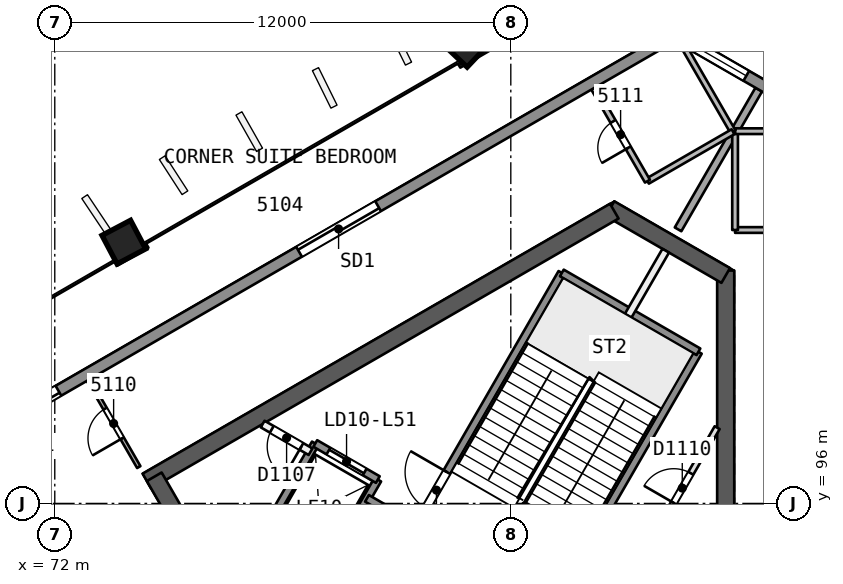
"""IFC4 building model, lengths in metres.
Left out: names, types, materials, properties, quantities, classifications, styles, units other than length and angle.
Written with IfcOpenShell. Run it as: python <this file> out.ifc"""

import sys

from ifc_helpers import new_model, si_unit, direction, frame, frame_2d, origin, origin_2d, place, context, subcontext, project, spatial, rectangle, extrude, element, fill, save


model = new_model("IFC4")
c1 = context("Model", 3, precision=1e-05, world=origin(), true_north=direction((0.0, 1.0)))
c2 = subcontext(c1, "Body", "Model", "MODEL_VIEW")
j1 = project(units=[si_unit("LENGTHUNIT", "METRE"), si_unit("PLANEANGLEUNIT", "RADIAN")], contexts=[c1])
p1 = place(None, origin())
s1 = spatial("IfcSite", under=j1, at=p1, CompositionType="ELEMENT")
p2 = place(p1, origin())
s2 = spatial("IfcBuilding", under=s1, at=p2, CompositionType="ELEMENT")
p3 = place(p2, frame((0.0, 0.0, 209.5)))
s3 = spatial("IfcBuildingStorey", under=s2, at=p3, CompositionType="ELEMENT", Elevation=209.5)
p4 = place(p3, frame((89.655, 88.019, 0.0), z_axis=(0.0, 0.0, 1.0), x_axis=(0.0, 1.0, 0.0)))
e1 = element("IfcWall", 1, at=p4, inside=s3, PredefinedType="SHEAR", context=c2, shape_type="SweptSolid", body=[
    extrude(rectangle(XDim=14.108, YDim=0.45, at=frame_2d((7.054, 0.0))), origin(), (0.0, 0.0, 1.0), 3.7),
])
p5 = place(p3, frame((89.655, 101.998, 0.0), z_axis=(0.0, 0.0, 1.0), x_axis=(-0.866042179588, 0.49997094233, 0.0)))
e2 = element("IfcWall", 2, at=p5, inside=s3, PredefinedType="SHEAR", context=c2, shape_type="SweptSolid", body=[
    extrude(rectangle(XDim=3.515, YDim=0.45, at=frame_2d((1.758, 0.0))), origin(), (0.0, 0.0, 1.0), 3.7),
])
p6 = place(p3, frame((86.723, 103.69, 0.0), z_axis=(0.0, 0.0, 1.0), x_axis=(-0.866022713978, -0.500004658852, 0.0)))
e3 = element("IfcWall", 3, at=p6, inside=s3, PredefinedType="SHEAR", context=c2, shape_type="SweptSolid", body=[
    extrude(rectangle(XDim=14.203, YDim=0.45, at=frame_2d((7.102, 0.0))), origin(), (0.0, 0.0, 1.0), 3.7),
])
p7 = place(p3, frame((74.617, 96.701, 0.0), z_axis=(0.0, 0.0, 1.0), x_axis=(0.499994385119, -0.866028645513, 0.0)))
e4 = element("IfcWall", 4, at=p7, inside=s3, PredefinedType="SHEAR", context=c2, shape_type="SweptSolid", body=[
    extrude(rectangle(XDim=10.155, YDim=0.45, at=frame_2d((5.077, 0.0))), origin(), (0.0, 0.0, 1.0), 3.7),
])
p8 = place(p7, frame((8.005, 0.0, 0.0)))
e5 = element("IfcOpeningElement", 5, at=p8, cuts=e4, PredefinedType="OPENING", context=c2, shape_type="SweptSolid", body=[
    extrude(rectangle(XDim=1.2, YDim=2.1, at=frame_2d((0.6, 1.05))), frame((0.0, 0.235, 0.0), z_axis=(0.0, -1.0, 0.0), x_axis=(1.0, 0.0, 0.0)), (0.0, 0.0, 1.0), 0.471),
])
p9 = place(p3, frame((91.874, 109.226, 0.0), z_axis=(-0.017607037296, -0.030466109479, 0.999380712447), x_axis=(0.86581098392, -0.500371202332, 2.457e-09)))
e6 = element("IfcColumn", 6, at=p9, inside=s3, PredefinedType="COLUMN", context=c2, shape_type="SweptSolid", body=[
    extrude(rectangle(XDim=1.9, YDim=1.9, at=origin_2d()), origin(), (0.0, 0.0, 1.0), 3.702),
])
p10 = place(p3, frame((82.845, 108.115, 0.0), z_axis=(-0.008376454378, -0.028163354484, 0.999568237028), x_axis=(0.86585218107, 0.499844611273, 0.021339285781)))
e7 = element("IfcColumn", 7, at=p10, inside=s3, PredefinedType="COLUMN", context=c2, shape_type="SweptSolid", body=[
    extrude(rectangle(XDim=0.85, YDim=0.85, at=origin_2d()), origin(), (0.0, 0.0, 1.0), 3.702),
])
p11 = place(p3, frame((73.816, 102.902, 0.0), z_axis=(0.000857578916, -0.022824792675, 0.999739112668), x_axis=(0.866060437909, 0.499825470945, 0.010668480848)))
e8 = element("IfcColumn", 8, at=p11, inside=s3, PredefinedType="COLUMN", context=c2, shape_type="SweptSolid", body=[
    extrude(rectangle(XDim=0.85, YDim=0.85, at=origin_2d()), origin(), (0.0, 0.0, 1.0), 3.701),
])
p12 = place(p3, frame((92.727, 103.194, 0.0), z_axis=(0.0, 0.0, 1.0), x_axis=(-1.0, 0.0, 0.0)))
e9 = element("IfcWall", 9, at=p12, inside=s3, PredefinedType="PARTITIONING", context=c2, shape_type="SweptSolid", body=[
    extrude(rectangle(XDim=2.825, YDim=0.15, at=frame_2d((1.413, 0.0))), origin(), (0.0, 0.0, 1.0), 3.3),
])
p13 = place(p12, frame((1.013, 0.0, 0.0)))
e10 = element("IfcOpeningElement", 10, at=p13, cuts=e9, PredefinedType="OPENING", context=c2, shape_type="SweptSolid", body=[
    extrude(rectangle(XDim=0.8, YDim=2.1, at=frame_2d((0.4, 1.05))), frame((0.0, 0.085, 0.0), z_axis=(0.0, -1.0, 0.0), x_axis=(1.0, 0.0, 0.0)), (0.0, 0.0, 1.0), 0.171),
])
p14 = place(p3, frame((89.902, 103.194, 0.0), z_axis=(0.0, 0.0, 1.0), x_axis=(0.0, 1.0, 0.0)))
e11 = element("IfcWall", 11, at=p14, inside=s3, PredefinedType="PARTITIONING", context=c2, shape_type="SweptSolid", body=[
    extrude(rectangle(XDim=2.6, YDim=0.15, at=frame_2d((1.3, 0.0))), origin(), (0.0, 0.0, 1.0), 3.3),
])
p15 = place(p3, frame((89.902, 105.794, 0.0), z_axis=(0.0, 0.0, 1.0), x_axis=(1.0, 0.0, 0.0)))
e12 = element("IfcWall", 12, at=p15, inside=s3, PredefinedType="PARTITIONING", context=c2, shape_type="SweptSolid", body=[
    extrude(rectangle(XDim=2.519, YDim=0.15, at=frame_2d((1.259, 0.0))), origin(), (0.0, 0.0, 1.0), 3.3),
])
p16 = place(p3, frame((90.524, 106.889, 0.0), z_axis=(0.0, 0.0, 1.0), x_axis=(-0.499991184371, -0.86603049343, 0.0)))
e13 = element("IfcWall", 13, at=p16, inside=s3, PredefinedType="PARTITIONING", context=c2, shape_type="SweptSolid", body=[
    extrude(rectangle(XDim=4.247, YDim=0.2, at=frame_2d((2.123, 0.0))), origin(), (0.0, 0.0, 1.0), 3.3),
])
p17 = place(p3, frame((74.21, 96.956, 0.0), z_axis=(0.0, 0.0, 1.0), x_axis=(-0.49995654735, 0.86605048973, 0.0)))
e14 = element("IfcWall", 14, at=p17, inside=s3, PredefinedType="PARTITIONING", context=c2, shape_type="SweptSolid", body=[
    extrude(rectangle(XDim=2.648, YDim=0.1, at=frame_2d((1.324, 0.0))), origin(), (0.0, 0.0, 1.0), 3.3),
])
p18 = place(p17, frame((0.874, 0.0, 0.0)))
e15 = element("IfcOpeningElement", 15, at=p18, cuts=e14, PredefinedType="OPENING", context=c2, shape_type="SweptSolid", body=[
    extrude(rectangle(XDim=0.9, YDim=2.1, at=frame_2d((0.45, 1.05))), frame((0.0, 0.061, 0.0), z_axis=(0.0, -1.0, 0.0), x_axis=(1.0, 0.0, 0.0)), (0.0, 0.0, 1.0), 0.121),
])
p19 = place(p3, frame((69.376, 97.223, 0.0), z_axis=(0.0, 0.0, 1.0), x_axis=(0.499993571489, -0.866029115255, 0.0)))
e16 = element("IfcWall", 16, at=p19, inside=s3, PredefinedType="PARTITIONING", context=c2, shape_type="SweptSolid", body=[
    extrude(rectangle(XDim=10.627, YDim=0.2, at=frame_2d((5.313, 0.0))), origin(), (0.0, 0.0, 1.0), 3.3),
])
p20 = place(p3, frame((88.548, 108.03, 0.0), z_axis=(0.0, 0.0, 1.0), x_axis=(0.500058503878, -0.86599162392, 0.0)))
e17 = element("IfcWall", 17, at=p20, inside=s3, PredefinedType="PARTITIONING", context=c2, shape_type="SweptSolid", body=[
    extrude(rectangle(XDim=2.599, YDim=0.15, at=frame_2d((1.3, 0.0))), origin(), (0.0, 0.0, 1.0), 3.3),
])
p21 = place(p3, frame((89.848, 105.779, 0.0), z_axis=(0.0, 0.0, 1.0), x_axis=(-0.866021400173, -0.500006934395, 0.0)))
e18 = element("IfcWall", 18, at=p21, inside=s3, PredefinedType="PARTITIONING", context=c2, shape_type="SweptSolid", body=[
    extrude(rectangle(XDim=2.6, YDim=0.15, at=frame_2d((1.3, 0.0))), origin(), (0.0, 0.0, 1.0), 3.3),
])
p22 = place(p3, frame((87.596, 104.479, 0.0), z_axis=(0.0, 0.0, 1.0), x_axis=(-0.500014143148, 0.86601723808, 0.0)))
e19 = element("IfcWall", 19, at=p22, inside=s3, PredefinedType="PARTITIONING", context=c2, shape_type="SweptSolid", body=[
    extrude(rectangle(XDim=2.826, YDim=0.15, at=frame_2d((1.413, 0.0))), origin(), (0.0, 0.0, 1.0), 3.3),
])
p23 = place(p22, frame((1.013, 0.0, 0.0)))
e20 = element("IfcOpeningElement", 20, at=p23, cuts=e19, PredefinedType="OPENING", context=c2, shape_type="SweptSolid", body=[
    extrude(rectangle(XDim=0.8, YDim=2.1, at=frame_2d((0.4, 1.05))), frame((0.0, 0.085, 0.0), z_axis=(0.0, -1.0, 0.0), x_axis=(1.0, 0.0, 0.0)), (0.0, 0.0, 1.0), 0.171),
])
p24 = place(p3, frame((88.322, 108.333, 0.0), z_axis=(0.0, 0.0, 1.0), x_axis=(0.866014735099, -0.50001847825, 0.0)))
e21 = element("IfcWall", 21, at=p24, inside=s3, PredefinedType="SOLIDWALL", context=c2, shape_type="SweptSolid", body=[
    extrude(rectangle(XDim=5.259, YDim=0.3, at=frame_2d((2.629, 0.0))), origin(), (0.0, 0.0, 1.0), 3.3),
])
p25 = place(p24, frame((3.082, 0.0, 0.9)))
e22 = element("IfcOpeningElement", 22, at=p25, cuts=e21, PredefinedType="OPENING", context=c2, shape_type="SweptSolid", body=[
    extrude(rectangle(XDim=1.8, YDim=1.5, at=frame_2d((0.9, 0.75))), frame((0.0, 0.161, 0.0), z_axis=(0.0, -1.0, 0.0), x_axis=(1.0, 0.0, 0.0)), (0.0, 0.0, 1.0), 0.321),
])
p26 = place(p24, frame((0.365, 0.0, 0.9)))
e23 = element("IfcOpeningElement", 23, at=p26, cuts=e21, PredefinedType="OPENING", context=c2, shape_type="SweptSolid", body=[
    extrude(rectangle(XDim=1.8, YDim=1.5, at=frame_2d((0.9, 0.75))), frame((0.0, 0.161, 0.0), z_axis=(0.0, -1.0, 0.0), x_axis=(1.0, 0.0, 0.0)), (0.0, 0.0, 1.0), 0.321),
])
p27 = place(p3, frame((43.802, 82.63, 0.0), z_axis=(0.0, 0.0, 1.0), x_axis=(0.866026224187, 0.499998579018, 0.0)))
e24 = element("IfcWall", 24, at=p27, inside=s3, PredefinedType="SOLIDWALL", context=c2, shape_type="SweptSolid", body=[
    extrude(rectangle(XDim=51.406, YDim=0.3, at=frame_2d((25.703, 0.0))), origin(), (0.0, 0.0, 1.0), 3.3),
])
p28 = place(p27, frame((24.503, 0.0, 0.0)))
e25 = element("IfcOpeningElement", 25, at=p28, cuts=e24, PredefinedType="OPENING", context=c2, shape_type="SweptSolid", body=[
    extrude(rectangle(XDim=2.4, YDim=2.4, at=frame_2d((1.2, 1.2))), frame((0.0, 0.161, 0.0), z_axis=(0.0, -1.0, 0.0), x_axis=(1.0, 0.0, 0.0)), (0.0, 0.0, 1.0), 0.321),
])
p29 = place(p27, frame((30.271, 0.0, 0.0)))
e26 = element("IfcOpeningElement", 26, at=p29, cuts=e24, PredefinedType="OPENING", context=c2, shape_type="SweptSolid", body=[
    extrude(rectangle(XDim=2.4, YDim=2.4, at=frame_2d((1.2, 1.2))), frame((0.0, 0.161, 0.0), z_axis=(0.0, -1.0, 0.0), x_axis=(1.0, 0.0, 0.0)), (0.0, 0.0, 1.0), 0.321),
])
p30 = place(p27, frame((39.983, 0.0, 0.0)))
e27 = element("IfcOpeningElement", 27, at=p30, cuts=e24, PredefinedType="OPENING", context=c2, shape_type="SweptSolid", body=[
    extrude(rectangle(XDim=2.4, YDim=2.4, at=frame_2d((1.2, 1.2))), frame((0.0, 0.161, 0.0), z_axis=(0.0, -1.0, 0.0), x_axis=(1.0, 0.0, 0.0)), (0.0, 0.0, 1.0), 0.321),
])
p31 = place(p27, frame((18.736, 0.0, 0.0)))
e28 = element("IfcOpeningElement", 28, at=p31, cuts=e24, PredefinedType="OPENING", context=c2, shape_type="SweptSolid", body=[
    extrude(rectangle(XDim=2.4, YDim=2.4, at=frame_2d((1.2, 1.2))), frame((0.0, 0.161, 0.0), z_axis=(0.0, -1.0, 0.0), x_axis=(1.0, 0.0, 0.0)), (0.0, 0.0, 1.0), 0.321),
])
p32 = place(p27, frame((9.0, 0.0, 0.0)))
e29 = element("IfcOpeningElement", 29, at=p32, cuts=e24, PredefinedType="OPENING", context=c2, shape_type="SweptSolid", body=[
    extrude(rectangle(XDim=2.4, YDim=2.4, at=frame_2d((1.2, 1.2))), frame((0.0, 0.161, 0.0), z_axis=(0.0, -1.0, 0.0), x_axis=(1.0, 0.0, 0.0)), (0.0, 0.0, 1.0), 0.321),
])
p33 = place(p3, frame((87.621, 94.86, 0.0), z_axis=(0.0, 0.0, 1.0), x_axis=(0.499993116331, 0.866029378036, 0.0)))
e30 = element("IfcWall", 30, at=p33, inside=s3, PredefinedType="PARTITIONING", context=c2, shape_type="SweptSolid", body=[
    extrude(rectangle(XDim=3.618, YDim=0.15, at=frame_2d((1.809, 0.0))), origin(), (0.0, 0.0, 1.0), 3.3),
])
p34 = place(p33, frame((1.332, 0.0, 0.0)))
e31 = element("IfcOpeningElement", 31, at=p34, cuts=e30, PredefinedType="OPENING", context=c2, shape_type="SweptSolid", body=[
    extrude(rectangle(XDim=0.9, YDim=2.1, at=frame_2d((0.45, 1.05))), frame((0.0, 0.085, 0.0), z_axis=(0.0, -1.0, 0.0), x_axis=(1.0, 0.0, 0.0)), (0.0, 0.0, 1.0), 0.171),
])
p35 = place(p3, frame((85.087, 93.321, 0.0), z_axis=(0.0, 0.0, 1.0), x_axis=(0.500019787375, 0.866013979237, 0.0)))
e32 = element("IfcWall", 32, at=p35, inside=s3, PredefinedType="SOLIDWALL", context=c2, shape_type="SweptSolid", body=[
    extrude(rectangle(XDim=7.7, YDim=0.2, at=frame_2d((3.85, 0.0))), origin(), (0.0, 0.0, 1.0), 3.3),
])
p36 = place(p3, frame((87.09, 100.94, 0.0), z_axis=(0.0, 0.0, 1.0), x_axis=(0.500011643316, 0.866018681408, 0.0)))
e33 = element("IfcWall", 33, at=p36, inside=s3, PredefinedType="PARTITIONING", context=c2, shape_type="SweptSolid", body=[
    extrude(rectangle(XDim=1.973, YDim=0.2, at=frame_2d((0.987, 0.0))), origin(), (0.0, 0.0, 1.0), 3.3),
])
p37 = place(p3, frame((81.493, 95.396, 0.0), z_axis=(0.0, 0.0, 1.0), x_axis=(0.500006057782, 0.866021906294, 0.0)))
e34 = element("IfcWall", 34, at=p37, inside=s3, PredefinedType="SOLIDWALL", context=c2, shape_type="SweptSolid", body=[
    extrude(rectangle(XDim=7.7, YDim=0.2, at=frame_2d((3.85, 0.0))), origin(), (0.0, 0.0, 1.0), 3.3),
])
p38 = place(p37, frame((0.55, 0.0, 0.0)))
e35 = element("IfcOpeningElement", 35, at=p38, cuts=e34, PredefinedType="OPENING", context=c2, shape_type="SweptSolid", body=[
    extrude(rectangle(XDim=1.1, YDim=2.1, at=frame_2d((0.55, 1.05))), frame((0.0, 0.11, 0.0), z_axis=(0.0, -1.0, 0.0), x_axis=(1.0, 0.0, 0.0)), (0.0, 0.0, 1.0), 0.221),
])
for number, where, z_axis, x_axis in (
    (36, (78.976, 93.986, 0.0), (0.0, 0.0, 1.0), (0.5, 0.866, 0.0)),
    (37, (77.33, 94.936, 0.0), (0.0, 0.0, 1.0), (0.5, 0.866, 0.0)),
):
    element("IfcWall", number, at=place(p3, frame(where, z_axis=z_axis, x_axis=x_axis)), inside=s3, PredefinedType="SOLIDWALL", context=c2, shape_type="SweptSolid", body=[
        extrude(rectangle(XDim=3.05, YDim=0.2, at=frame_2d((1.525, 0.0))), origin(), (0.0, 0.0, 1.0), 3.3),
    ])
p39 = place(p3, frame((89.43, 90.814, 0.0), z_axis=(0.0, 0.0, 1.0), x_axis=(-0.866018983788, 0.500011119594, 0.0)))
e38 = element("IfcWall", 38, at=p39, inside=s3, PredefinedType="SOLIDWALL", context=c2, shape_type="SweptSolid", body=[
    extrude(rectangle(XDim=10.64, YDim=0.2, at=frame_2d((5.32, 0.0))), origin(), (0.0, 0.0, 1.0), 3.3),
])
p40 = place(p39, frame((0.37, 0.0, 0.0)))
e39 = element("IfcOpeningElement", 39, at=p40, cuts=e38, PredefinedType="OPENING", context=c2, shape_type="SweptSolid", body=[
    extrude(rectangle(XDim=0.9, YDim=2.1, at=frame_2d((0.45, 1.05))), frame((0.0, 0.11, 0.0), z_axis=(0.0, -1.0, 0.0), x_axis=(1.0, 0.0, 0.0)), (0.0, 0.0, 1.0), 0.221),
])
p41 = place(p3, frame((78.73, 97.361, 0.0), z_axis=(0.0, 0.0, 1.0), x_axis=(-0.866045896294, 0.499964504253, 0.0)))
e40 = element("IfcWall", 40, at=p41, inside=s3, PredefinedType="PARTITIONING", context=c2, shape_type="SweptSolid", body=[
    extrude(rectangle(XDim=1.455, YDim=0.2, at=frame_2d((0.728, 0.0))), origin(), (0.0, 0.0, 1.0), 3.3),
])
p42 = place(p41, frame((0.278, 0.0, 0.0)))
e41 = element("IfcOpeningElement", 41, at=p42, cuts=e40, PredefinedType="OPENING", context=c2, shape_type="SweptSolid", body=[
    extrude(rectangle(XDim=0.9, YDim=2.1, at=frame_2d((0.45, 1.05))), frame((0.0, 0.11, 0.0), z_axis=(0.0, -1.0, 0.0), x_axis=(1.0, 0.0, 0.0)), (0.0, 0.0, 1.0), 0.221),
])
p43 = place(p3, frame((80.5, 96.627, 0.0), z_axis=(0.0, 0.0, 1.0), x_axis=(-0.86601224135, 0.500022797313, 0.0)))
e42 = element("IfcWall", 42, at=p43, inside=s3, PredefinedType="SOLIDWALL", context=c2, shape_type="SweptSolid", body=[
    extrude(rectangle(XDim=1.9, YDim=0.2, at=frame_2d((0.95, 0.0))), origin(), (0.0, 0.0, 1.0), 3.3),
])
p44 = place(p43, frame((0.4, 0.0, 0.0)))
e43 = element("IfcOpeningElement", 43, at=p44, cuts=e42, PredefinedType="OPENING", context=c2, shape_type="SweptSolid", body=[
    extrude(rectangle(XDim=1.1, YDim=2.1, at=frame_2d((0.55, 1.05))), frame((0.0, 0.11, 0.0), z_axis=(0.0, -1.0, 0.0), x_axis=(1.0, 0.0, 0.0)), (0.0, 0.0, 1.0), 0.221),
])
p45 = place(p3, frame((88.937, 99.99, 0.0), z_axis=(0.0, 0.0, 1.0), x_axis=(-0.866004344652, 0.500036473714, 0.0)))
e44 = element("IfcWall", 44, at=p45, inside=s3, PredefinedType="SOLIDWALL", context=c2, shape_type="SweptSolid", body=[
    extrude(rectangle(XDim=4.15, YDim=0.2, at=frame_2d((2.075, 0.0))), origin(), (0.0, 0.0, 1.0), 3.3),
])
p46 = place(p18, origin())
e45 = element("IfcDoor", 45, at=p46, inside=s3, OperationType="SINGLE_SWING_LEFT", PredefinedType="NOTDEFINED", context=c2, shape_type="SweptSolid", body=[
    extrude(rectangle(XDim=0.9, YDim=2.1, at=frame_2d((0.45, 1.05))), frame((0.0, 0.025, 0.0), z_axis=(0.0, -1.0, 0.0), x_axis=(1.0, 0.0, 0.0)), (0.0, 0.0, 1.0), 0.05),
])
fill(e15, e45)
p47 = place(p23, origin())
e46 = element("IfcDoor", 46, at=p47, inside=s3, OperationType="SINGLE_SWING_LEFT", PredefinedType="NOTDEFINED", context=c2, shape_type="SweptSolid", body=[
    extrude(rectangle(XDim=0.8, YDim=2.1, at=frame_2d((0.4, 1.05))), frame((0.0, 0.025, 0.0), z_axis=(0.0, -1.0, 0.0), x_axis=(1.0, 0.0, 0.0)), (0.0, 0.0, 1.0), 0.05),
])
fill(e20, e46)
p48 = place(p26, origin())
e47 = element("IfcWindow", 47, at=p48, inside=s3, PartitioningType="SINGLE_PANEL", PredefinedType="WINDOW", context=c2, shape_type="SweptSolid", body=[
    extrude(rectangle(XDim=1.8, YDim=1.5, at=frame_2d((0.9, 0.75))), frame((0.0, 0.03, 0.0), z_axis=(0.0, -1.0, 0.0), x_axis=(1.0, 0.0, 0.0)), (0.0, 0.0, 1.0), 0.06),
])
fill(e23, e47)
p49 = place(p29, origin())
e48 = element("IfcDoor", 48, at=p49, inside=s3, OperationType="SLIDING_TO_RIGHT", PredefinedType="NOTDEFINED", context=c2, shape_type="SweptSolid", body=[
    extrude(rectangle(XDim=2.4, YDim=2.4, at=frame_2d((1.2, 1.2))), frame((0.0, 0.025, 0.0), z_axis=(0.0, -1.0, 0.0), x_axis=(1.0, 0.0, 0.0)), (0.0, 0.0, 1.0), 0.05),
])
fill(e26, e48)
p50 = place(p30, origin())
e49 = element("IfcDoor", 49, at=p50, inside=s3, OperationType="SLIDING_TO_LEFT", PredefinedType="NOTDEFINED", context=c2, shape_type="SweptSolid", body=[
    extrude(rectangle(XDim=2.4, YDim=2.4, at=frame_2d((1.2, 1.2))), frame((0.0, 0.025, 0.0), z_axis=(0.0, -1.0, 0.0), x_axis=(1.0, 0.0, 0.0)), (0.0, 0.0, 1.0), 0.05),
])
fill(e27, e49)
p51 = place(p44, origin())
e50 = element("IfcDoor", 50, at=p51, inside=s3, OperationType="SLIDING_TO_RIGHT", PredefinedType="NOTDEFINED", context=c2, shape_type="SweptSolid", body=[
    extrude(rectangle(XDim=1.1, YDim=2.1, at=frame_2d((0.55, 1.05))), frame((0.0, 0.025, 0.0), z_axis=(0.0, -1.0, 0.0), x_axis=(1.0, 0.0, 0.0)), (0.0, 0.0, 1.0), 0.05),
])
fill(e43, e50)
p52 = place(p42, origin())
e51 = element("IfcDoor", 51, at=p52, inside=s3, OperationType="SINGLE_SWING_LEFT", PredefinedType="NOTDEFINED", context=c2, shape_type="SweptSolid", body=[
    extrude(rectangle(XDim=0.9, YDim=2.1, at=frame_2d((0.45, 1.05))), frame((0.0, 0.025, 0.0), z_axis=(0.0, -1.0, 0.0), x_axis=(1.0, 0.0, 0.0)), (0.0, 0.0, 1.0), 0.05),
])
fill(e41, e51)
p53 = place(p38, origin())
e52 = element("IfcDoor", 52, at=p53, inside=s3, OperationType="SINGLE_SWING_RIGHT", PredefinedType="NOTDEFINED", context=c2, shape_type="SweptSolid", body=[
    extrude(rectangle(XDim=1.1, YDim=2.1, at=frame_2d((0.55, 1.05))), frame((0.0, 0.025, 0.0), z_axis=(0.0, -1.0, 0.0), x_axis=(1.0, 0.0, 0.0)), (0.0, 0.0, 1.0), 0.05),
])
fill(e35, e52)
p54 = place(p34, origin())
e53 = element("IfcDoor", 53, at=p54, inside=s3, OperationType="SINGLE_SWING_LEFT", PredefinedType="NOTDEFINED", context=c2, shape_type="SweptSolid", body=[
    extrude(rectangle(XDim=0.9, YDim=2.1, at=frame_2d((0.45, 1.05))), frame((0.0, 0.025, 0.0), z_axis=(0.0, -1.0, 0.0), x_axis=(1.0, 0.0, 0.0)), (0.0, 0.0, 1.0), 0.05),
])
fill(e31, e53)
save(model, sys.argv[1])
